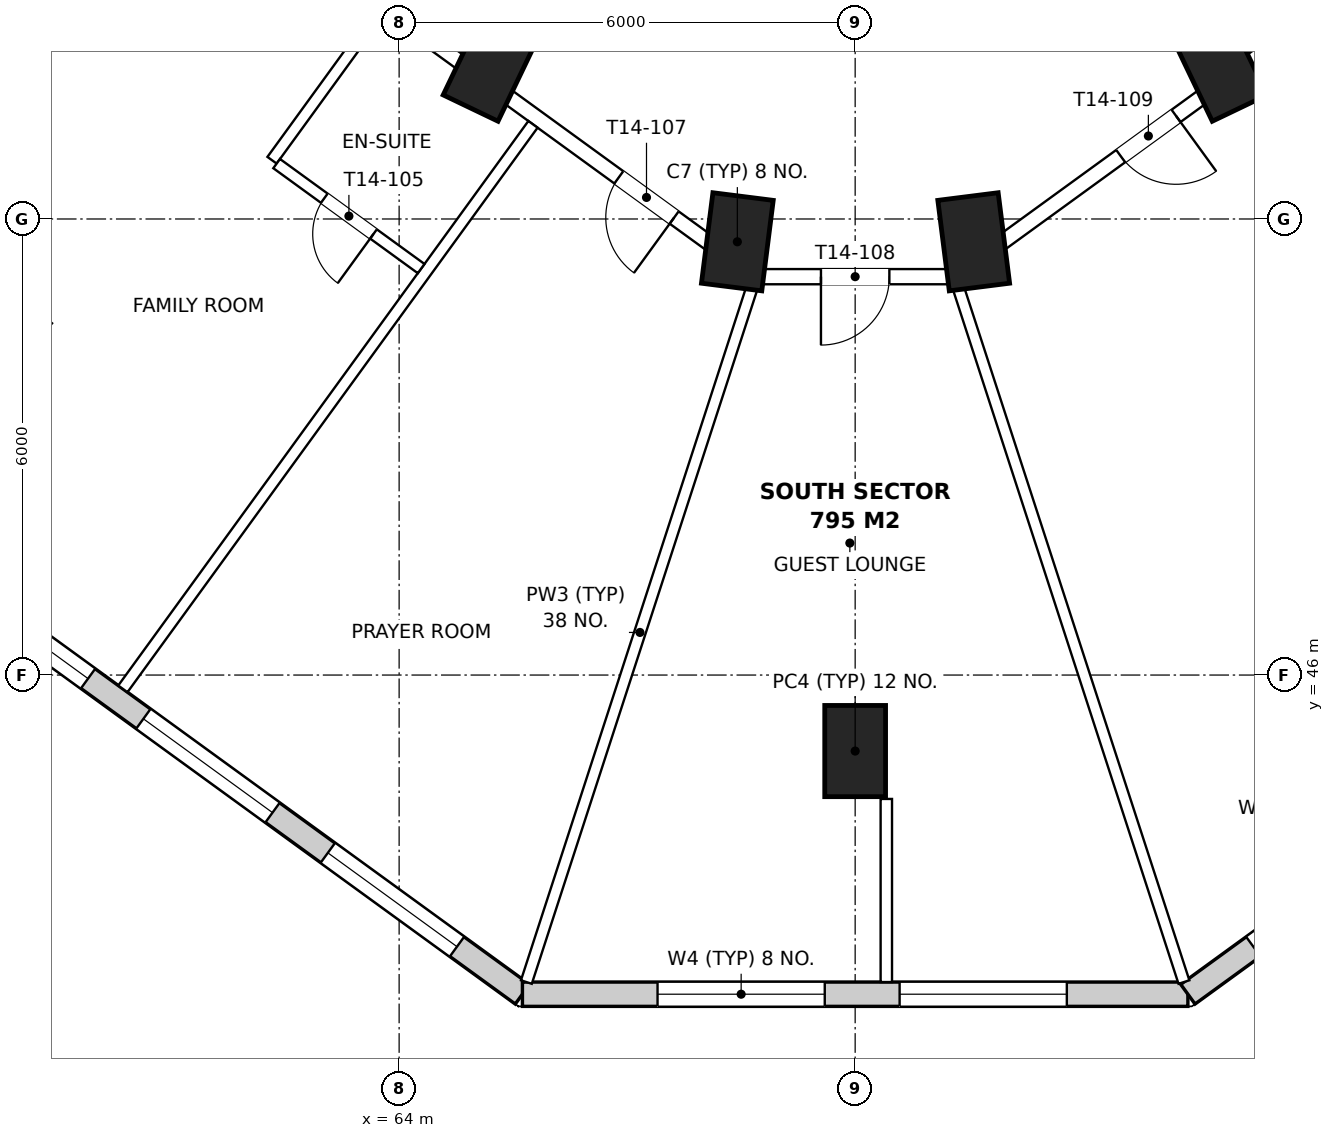
"""IFC4 building model, lengths in metres.
Left out: names, types, materials, properties, quantities, classifications, styles, units other than length and angle.
Written with IfcOpenShell. Run it as: python <this file> out.ifc"""

import sys

from ifc_helpers import new_model, si_unit, direction, frame, frame_2d, origin, origin_2d, place, context, subcontext, project, spatial, rectangle, extrude, element, fill, save


model = new_model("IFC4")
c1 = context("Model", 3, precision=1e-05, world=origin(), true_north=direction((0.0, 1.0)))
c2 = subcontext(c1, "Body", "Model", "MODEL_VIEW")
j1 = project(units=[si_unit("LENGTHUNIT", "METRE"), si_unit("PLANEANGLEUNIT", "RADIAN")], contexts=[c1])
p1 = place(None, origin())
s1 = spatial("IfcSite", under=j1, at=p1, CompositionType="ELEMENT")
p2 = place(p1, origin())
s2 = spatial("IfcBuilding", under=s1, at=p2, CompositionType="ELEMENT")
p3 = place(p2, frame((0.0, 0.0, 204.3)))
s3 = spatial("IfcBuildingStorey", under=s2, at=p3, CompositionType="ELEMENT", Elevation=204.3)
for number, where, z_axis, x_axis in (
    (1, (70.0, 45.0, 0.0), (0.0, 0.0, 1.0), (-1.0, 0.0, 0.0)),
    (2, (65.2, 54.0, 0.0), (0.0, 0.0, 1.0), (-0.902, 0.432, 0.0)),
    (3, (68.45, 51.7, 0.0), (0.0, 0.0, 1.0), (-0.992, 0.126, 0.0)),
    (4, (71.56, 51.7, 0.0), (0.0, 0.0, 1.0), (-0.992, -0.126, 0.0)),
    (5, (74.8, 54.0, 0.0), (0.0, 0.0, 1.0), (-0.902, -0.432, 0.0)),
):
    element("IfcColumn", number, at=place(p3, frame(where, z_axis=z_axis, x_axis=x_axis)), inside=s3, PredefinedType="COLUMN", context=c2, shape_type="SweptSolid", body=[
        extrude(rectangle(XDim=0.8, YDim=1.2, at=origin_2d()), origin(), (0.0, 0.0, 1.0), 3.9),
    ])
p4 = place(p3, frame((47.639, 54.867, 0.0), z_axis=(0.0, 0.0, 1.0), x_axis=(0.809017634756, -0.587784370883, 0.0)))
e6 = element("IfcWall", 6, at=p4, inside=s3, PredefinedType="SOLIDWALL", context=c2, shape_type="SweptSolid", body=[
    extrude(rectangle(XDim=22.229, YDim=0.32, at=frame_2d((11.114, 0.0))), origin(), (0.0, 0.0, 1.0), 3.6),
])
p5 = place(p4, frame((1.064, 0.0, 0.75)))
e7 = element("IfcOpeningElement", 7, at=p5, cuts=e6, PredefinedType="OPENING", context=c2, shape_type="SweptSolid", body=[
    extrude(rectangle(XDim=2.1, YDim=2.1, at=frame_2d((1.05, 1.05))), frame((0.0, 0.17, 0.0), z_axis=(0.0, -1.0, 0.0), x_axis=(1.0, 0.0, 0.0)), (0.0, 0.0, 1.0), 0.34),
])
p6 = place(p4, frame((4.064, 0.0, 0.75)))
e8 = element("IfcOpeningElement", 8, at=p6, cuts=e6, PredefinedType="OPENING", context=c2, shape_type="SweptSolid", body=[
    extrude(rectangle(XDim=2.1, YDim=2.1, at=frame_2d((1.05, 1.05))), frame((0.0, 0.17, 0.0), z_axis=(0.0, -1.0, 0.0), x_axis=(1.0, 0.0, 0.0)), (0.0, 0.0, 1.0), 0.34),
])
p7 = place(p4, frame((7.064, 0.0, 0.75)))
e9 = element("IfcOpeningElement", 9, at=p7, cuts=e6, PredefinedType="OPENING", context=c2, shape_type="SweptSolid", body=[
    extrude(rectangle(XDim=2.1, YDim=2.1, at=frame_2d((1.05, 1.05))), frame((0.0, 0.17, 0.0), z_axis=(0.0, -1.0, 0.0), x_axis=(1.0, 0.0, 0.0)), (0.0, 0.0, 1.0), 0.34),
])
p8 = place(p4, frame((10.064, 0.0, 0.75)))
e10 = element("IfcOpeningElement", 10, at=p8, cuts=e6, PredefinedType="OPENING", context=c2, shape_type="SweptSolid", body=[
    extrude(rectangle(XDim=2.1, YDim=2.1, at=frame_2d((1.05, 1.05))), frame((0.0, 0.17, 0.0), z_axis=(0.0, -1.0, 0.0), x_axis=(1.0, 0.0, 0.0)), (0.0, 0.0, 1.0), 0.34),
])
p9 = place(p4, frame((13.064, 0.0, 0.75)))
e11 = element("IfcOpeningElement", 11, at=p9, cuts=e6, PredefinedType="OPENING", context=c2, shape_type="SweptSolid", body=[
    extrude(rectangle(XDim=2.1, YDim=2.1, at=frame_2d((1.05, 1.05))), frame((0.0, 0.17, 0.0), z_axis=(0.0, -1.0, 0.0), x_axis=(1.0, 0.0, 0.0)), (0.0, 0.0, 1.0), 0.34),
])
p10 = place(p4, frame((16.064, 0.0, 0.75)))
e12 = element("IfcOpeningElement", 12, at=p10, cuts=e6, PredefinedType="OPENING", context=c2, shape_type="SweptSolid", body=[
    extrude(rectangle(XDim=2.1, YDim=2.1, at=frame_2d((1.05, 1.05))), frame((0.0, 0.17, 0.0), z_axis=(0.0, -1.0, 0.0), x_axis=(1.0, 0.0, 0.0)), (0.0, 0.0, 1.0), 0.34),
])
p11 = place(p4, frame((19.064, 0.0, 0.75)))
e13 = element("IfcOpeningElement", 13, at=p11, cuts=e6, PredefinedType="OPENING", context=c2, shape_type="SweptSolid", body=[
    extrude(rectangle(XDim=2.1, YDim=2.1, at=frame_2d((1.05, 1.05))), frame((0.0, 0.17, 0.0), z_axis=(0.0, -1.0, 0.0), x_axis=(1.0, 0.0, 0.0)), (0.0, 0.0, 1.0), 0.34),
])
p12 = place(p3, frame((65.622, 41.801, 0.0), z_axis=(0.0, 0.0, 1.0), x_axis=(1.0, 0.0, 0.0)))
e14 = element("IfcWall", 14, at=p12, inside=s3, PredefinedType="SOLIDWALL", context=c2, shape_type="SweptSolid", body=[
    extrude(rectangle(XDim=8.755, YDim=0.32, at=frame_2d((4.378, 0.0))), origin(), (0.0, 0.0, 1.0), 3.6),
])
p13 = place(p12, frame((1.778, 0.0, 0.75)))
e15 = element("IfcOpeningElement", 15, at=p13, cuts=e14, PredefinedType="OPENING", context=c2, shape_type="SweptSolid", body=[
    extrude(rectangle(XDim=2.2, YDim=2.1, at=frame_2d((1.1, 1.05))), frame((0.0, 0.17, 0.0), z_axis=(0.0, -1.0, 0.0), x_axis=(1.0, 0.0, 0.0)), (0.0, 0.0, 1.0), 0.34),
])
p14 = place(p12, frame((4.963, 0.0, 0.75)))
e16 = element("IfcOpeningElement", 16, at=p14, cuts=e14, PredefinedType="OPENING", context=c2, shape_type="SweptSolid", body=[
    extrude(rectangle(XDim=2.2, YDim=2.1, at=frame_2d((1.1, 1.05))), frame((0.0, 0.17, 0.0), z_axis=(0.0, -1.0, 0.0), x_axis=(1.0, 0.0, 0.0)), (0.0, 0.0, 1.0), 0.34),
])
p15 = place(p3, frame((74.378, 41.801, 0.0), z_axis=(0.0, 0.0, 1.0), x_axis=(0.809017634756, 0.587784370883, 0.0)))
e17 = element("IfcWall", 17, at=p15, inside=s3, PredefinedType="SOLIDWALL", context=c2, shape_type="SweptSolid", body=[
    extrude(rectangle(XDim=22.229, YDim=0.32, at=frame_2d((11.114, 0.0))), origin(), (0.0, 0.0, 1.0), 3.6),
])
p16 = place(p15, frame((1.064, 0.0, 0.75)))
e18 = element("IfcOpeningElement", 18, at=p16, cuts=e17, PredefinedType="OPENING", context=c2, shape_type="SweptSolid", body=[
    extrude(rectangle(XDim=2.1, YDim=2.1, at=frame_2d((1.05, 1.05))), frame((0.0, 0.17, 0.0), z_axis=(0.0, -1.0, 0.0), x_axis=(1.0, 0.0, 0.0)), (0.0, 0.0, 1.0), 0.34),
])
p17 = place(p15, frame((4.064, 0.0, 0.75)))
e19 = element("IfcOpeningElement", 19, at=p17, cuts=e17, PredefinedType="OPENING", context=c2, shape_type="SweptSolid", body=[
    extrude(rectangle(XDim=2.1, YDim=2.1, at=frame_2d((1.05, 1.05))), frame((0.0, 0.17, 0.0), z_axis=(0.0, -1.0, 0.0), x_axis=(1.0, 0.0, 0.0)), (0.0, 0.0, 1.0), 0.34),
])
p18 = place(p15, frame((7.064, 0.0, 0.75)))
e20 = element("IfcOpeningElement", 20, at=p18, cuts=e17, PredefinedType="OPENING", context=c2, shape_type="SweptSolid", body=[
    extrude(rectangle(XDim=2.1, YDim=2.1, at=frame_2d((1.05, 1.05))), frame((0.0, 0.17, 0.0), z_axis=(0.0, -1.0, 0.0), x_axis=(1.0, 0.0, 0.0)), (0.0, 0.0, 1.0), 0.34),
])
p19 = place(p15, frame((10.064, 0.0, 0.75)))
e21 = element("IfcOpeningElement", 21, at=p19, cuts=e17, PredefinedType="OPENING", context=c2, shape_type="SweptSolid", body=[
    extrude(rectangle(XDim=2.1, YDim=2.1, at=frame_2d((1.05, 1.05))), frame((0.0, 0.17, 0.0), z_axis=(0.0, -1.0, 0.0), x_axis=(1.0, 0.0, 0.0)), (0.0, 0.0, 1.0), 0.34),
])
p20 = place(p15, frame((13.064, 0.0, 0.75)))
e22 = element("IfcOpeningElement", 22, at=p20, cuts=e17, PredefinedType="OPENING", context=c2, shape_type="SweptSolid", body=[
    extrude(rectangle(XDim=2.1, YDim=2.1, at=frame_2d((1.05, 1.05))), frame((0.0, 0.17, 0.0), z_axis=(0.0, -1.0, 0.0), x_axis=(1.0, 0.0, 0.0)), (0.0, 0.0, 1.0), 0.34),
])
p21 = place(p15, frame((16.064, 0.0, 0.75)))
e23 = element("IfcOpeningElement", 23, at=p21, cuts=e17, PredefinedType="OPENING", context=c2, shape_type="SweptSolid", body=[
    extrude(rectangle(XDim=2.1, YDim=2.1, at=frame_2d((1.05, 1.05))), frame((0.0, 0.17, 0.0), z_axis=(0.0, -1.0, 0.0), x_axis=(1.0, 0.0, 0.0)), (0.0, 0.0, 1.0), 0.34),
])
p22 = place(p15, frame((19.064, 0.0, 0.75)))
e24 = element("IfcOpeningElement", 24, at=p22, cuts=e17, PredefinedType="OPENING", context=c2, shape_type="SweptSolid", body=[
    extrude(rectangle(XDim=2.1, YDim=2.1, at=frame_2d((1.05, 1.05))), frame((0.0, 0.17, 0.0), z_axis=(0.0, -1.0, 0.0), x_axis=(1.0, 0.0, 0.0)), (0.0, 0.0, 1.0), 0.34),
])
p23 = place(p3, frame((77.559, 55.781, 0.0), z_axis=(0.0, 0.0, 1.0), x_axis=(-0.80901190539, -0.587792256616, 0.0)))
e25 = element("IfcWall", 25, at=p23, inside=s3, PredefinedType="PARTITIONING", context=c2, shape_type="SweptSolid", body=[
    extrude(rectangle(XDim=7.691, YDim=0.2, at=frame_2d((3.846, 0.0))), origin(), (0.0, 0.0, 1.0), 3.05),
])
p24 = place(p23, frame((4.125, 0.0, 0.0)))
e26 = element("IfcOpeningElement", 26, at=p24, cuts=e25, PredefinedType="OPENING", context=c2, shape_type="SweptSolid", body=[
    extrude(rectangle(XDim=0.9, YDim=2.1, at=frame_2d((0.45, 1.05))), frame((0.0, 0.11, 0.0), z_axis=(0.0, -1.0, 0.0), x_axis=(1.0, 0.0, 0.0)), (0.0, 0.0, 1.0), 0.22),
])
p25 = place(p3, frame((71.278, 51.241, 0.0), z_axis=(0.0, 0.0, 1.0), x_axis=(-1.0, 0.0, 0.0)))
e27 = element("IfcWall", 27, at=p25, inside=s3, PredefinedType="PARTITIONING", context=c2, shape_type="SweptSolid", body=[
    extrude(rectangle(XDim=2.556, YDim=0.2, at=frame_2d((1.278, 0.0))), origin(), (0.0, 0.0, 1.0), 3.6),
])
p26 = place(p25, frame((0.828, 0.0, 0.0)))
e28 = element("IfcOpeningElement", 28, at=p26, cuts=e27, PredefinedType="OPENING", context=c2, shape_type="SweptSolid", body=[
    extrude(rectangle(XDim=0.9, YDim=2.1, at=frame_2d((0.45, 1.05))), frame((0.0, 0.11, 0.0), z_axis=(0.0, -1.0, 0.0), x_axis=(1.0, 0.0, 0.0)), (0.0, 0.0, 1.0), 0.22),
])
p27 = place(p3, frame((68.663, 51.26, 0.0), z_axis=(0.0, 0.0, 1.0), x_axis=(-0.80901190539, 0.587792256616, 0.0)))
e29 = element("IfcWall", 29, at=p27, inside=s3, PredefinedType="PARTITIONING", context=c2, shape_type="SweptSolid", body=[
    extrude(rectangle(XDim=7.691, YDim=0.2, at=frame_2d((3.846, 0.0))), origin(), (0.0, 0.0, 1.0), 3.05),
])
p28 = place(p27, frame((6.604, 0.0, 0.0)))
e30 = element("IfcOpeningElement", 30, at=p28, cuts=e29, PredefinedType="OPENING", context=c2, shape_type="SweptSolid", body=[
    extrude(rectangle(XDim=0.9, YDim=2.1, at=frame_2d((0.45, 1.05))), frame((0.0, 0.11, 0.0), z_axis=(0.0, -1.0, 0.0), x_axis=(1.0, 0.0, 0.0)), (0.0, 0.0, 1.0), 0.22),
])
p29 = place(p27, frame((1.291, 0.0, 0.0)))
e31 = element("IfcOpeningElement", 31, at=p29, cuts=e29, PredefinedType="OPENING", context=c2, shape_type="SweptSolid", body=[
    extrude(rectangle(XDim=0.9, YDim=2.1, at=frame_2d((0.45, 1.05))), frame((0.0, 0.11, 0.0), z_axis=(0.0, -1.0, 0.0), x_axis=(1.0, 0.0, 0.0)), (0.0, 0.0, 1.0), 0.22),
])
for number, where, z_axis, x_axis in (
    (32, (65.674, 41.961, 0.0), (0.0, 0.0, 1.0), (0.309, 0.951, 0.0)),
    (33, (74.326, 41.961, 0.0), (0.0, 0.0, 1.0), (-0.309, 0.951, 0.0)),
):
    element("IfcWall", number, at=place(p3, frame(where, z_axis=z_axis, x_axis=x_axis)), inside=s3, PredefinedType="PARTITIONING", context=c2, shape_type="SweptSolid", body=[
        extrude(rectangle(XDim=9.672, YDim=0.15, at=frame_2d((4.836, 0.0))), origin(), (0.0, 0.0, 1.0), 3.6),
    ])
p30 = place(p3, frame((55.511, 49.345, 0.0), z_axis=(0.0, 0.0, 1.0), x_axis=(0.587782705134, 0.809018844988, 0.0)))
e34 = element("IfcWall", 34, at=p30, inside=s3, PredefinedType="PARTITIONING", context=c2, shape_type="SweptSolid", body=[
    extrude(rectangle(XDim=7.801, YDim=0.15, at=frame_2d((3.9, 0.0))), origin(), (0.0, 0.0, 1.0), 3.15),
])
p31 = place(p3, frame((60.365, 45.818, 0.0), z_axis=(0.0, 0.0, 1.0), x_axis=(0.587777877013, 0.809022352778, 0.0)))
e35 = element("IfcWall", 35, at=p31, inside=s3, PredefinedType="PARTITIONING", context=c2, shape_type="SweptSolid", body=[
    extrude(rectangle(XDim=9.18, YDim=0.15, at=frame_2d((4.59, 0.0))), origin(), (0.0, 0.0, 1.0), 3.6),
])
p32 = place(p3, frame((63.739, 54.715, 0.0), z_axis=(0.0, 0.0, 1.0), x_axis=(-0.587772420479, -0.809026317077, 0.0)))
e36 = element("IfcWall", 36, at=p32, inside=s3, PredefinedType="PARTITIONING", context=c2, shape_type="SweptSolid", body=[
    extrude(rectangle(XDim=2.4, YDim=0.15, at=frame_2d((1.2, 0.0))), origin(), (0.0, 0.0, 1.0), 3.6),
])
p33 = place(p3, frame((64.29, 51.347, 0.0), z_axis=(0.0, 0.0, 1.0), x_axis=(-0.808996573949, 0.587813357571, 0.0)))
e37 = element("IfcWall", 37, at=p33, inside=s3, PredefinedType="PARTITIONING", context=c2, shape_type="SweptSolid", body=[
    extrude(rectangle(XDim=2.35, YDim=0.15, at=frame_2d((1.175, 0.0))), origin(), (0.0, 0.0, 1.0), 3.6),
])
p34 = place(p33, frame((0.775, 0.0, 0.0)))
e38 = element("IfcOpeningElement", 38, at=p34, cuts=e37, PredefinedType="OPENING", context=c2, shape_type="SweptSolid", body=[
    extrude(rectangle(XDim=0.8, YDim=2.1, at=frame_2d((0.4, 1.05))), frame((0.0, 0.085, 0.0), z_axis=(0.0, -1.0, 0.0), x_axis=(1.0, 0.0, 0.0)), (0.0, 0.0, 1.0), 0.17),
])
p35 = place(p3, frame((70.41, 44.37, 0.0), z_axis=(0.0, 0.0, 1.0), x_axis=(0.0, -1.0, 0.0)))
e39 = element("IfcWall", 39, at=p35, inside=s3, PredefinedType="PARTITIONING", context=c2, shape_type="SweptSolid", body=[
    extrude(rectangle(XDim=2.409, YDim=0.15, at=frame_2d((1.205, 0.0))), origin(), (0.0, 0.0, 1.0), 3.6),
])
p36 = place(p9, origin())
e40 = element("IfcWindow", 40, at=p36, inside=s3, PartitioningType="SINGLE_PANEL", PredefinedType="WINDOW", context=c2, shape_type="SweptSolid", body=[
    extrude(rectangle(XDim=2.1, YDim=2.1, at=frame_2d((1.05, 1.05))), frame((0.0, 0.07, 0.0), z_axis=(0.0, -1.0, 0.0), x_axis=(1.0, 0.0, 0.0)), (0.0, 0.0, 1.0), 0.06),
])
fill(e11, e40)
p37 = place(p10, origin())
e41 = element("IfcWindow", 41, at=p37, inside=s3, PartitioningType="SINGLE_PANEL", PredefinedType="WINDOW", context=c2, shape_type="SweptSolid", body=[
    extrude(rectangle(XDim=2.1, YDim=2.1, at=frame_2d((1.05, 1.05))), frame((0.0, 0.07, 0.0), z_axis=(0.0, -1.0, 0.0), x_axis=(1.0, 0.0, 0.0)), (0.0, 0.0, 1.0), 0.06),
])
fill(e12, e41)
p38 = place(p11, origin())
e42 = element("IfcWindow", 42, at=p38, inside=s3, PartitioningType="SINGLE_PANEL", PredefinedType="WINDOW", context=c2, shape_type="SweptSolid", body=[
    extrude(rectangle(XDim=2.1, YDim=2.1, at=frame_2d((1.05, 1.05))), frame((0.0, 0.07, 0.0), z_axis=(0.0, -1.0, 0.0), x_axis=(1.0, 0.0, 0.0)), (0.0, 0.0, 1.0), 0.06),
])
fill(e13, e42)
p39 = place(p13, origin())
e43 = element("IfcWindow", 43, at=p39, inside=s3, PartitioningType="SINGLE_PANEL", PredefinedType="WINDOW", context=c2, shape_type="SweptSolid", body=[
    extrude(rectangle(XDim=2.2, YDim=2.1, at=frame_2d((1.1, 1.05))), frame((0.0, 0.07, 0.0), z_axis=(0.0, -1.0, 0.0), x_axis=(1.0, 0.0, 0.0)), (0.0, 0.0, 1.0), 0.06),
])
fill(e15, e43)
p40 = place(p14, origin())
e44 = element("IfcWindow", 44, at=p40, inside=s3, PartitioningType="SINGLE_PANEL", PredefinedType="WINDOW", context=c2, shape_type="SweptSolid", body=[
    extrude(rectangle(XDim=2.2, YDim=2.1, at=frame_2d((1.1, 1.05))), frame((0.0, 0.07, 0.0), z_axis=(0.0, -1.0, 0.0), x_axis=(1.0, 0.0, 0.0)), (0.0, 0.0, 1.0), 0.06),
])
fill(e16, e44)
p41 = place(p16, origin())
e45 = element("IfcWindow", 45, at=p41, inside=s3, PartitioningType="SINGLE_PANEL", PredefinedType="WINDOW", context=c2, shape_type="SweptSolid", body=[
    extrude(rectangle(XDim=2.1, YDim=2.1, at=frame_2d((1.05, 1.05))), frame((0.0, 0.07, 0.0), z_axis=(0.0, -1.0, 0.0), x_axis=(1.0, 0.0, 0.0)), (0.0, 0.0, 1.0), 0.06),
])
fill(e18, e45)
p42 = place(p34, origin())
e46 = element("IfcDoor", 46, at=p42, inside=s3, OperationType="SINGLE_SWING_LEFT", PredefinedType="DOOR", context=c2, shape_type="SweptSolid", body=[
    extrude(rectangle(XDim=0.8, YDim=2.1, at=frame_2d((0.4, 1.05))), frame((0.0, 0.025, 0.0), z_axis=(0.0, -1.0, 0.0), x_axis=(1.0, 0.0, 0.0)), (0.0, 0.0, 1.0), 0.05),
])
fill(e38, e46)
p43 = place(p29, origin())
e47 = element("IfcDoor", 47, at=p43, inside=s3, OperationType="SINGLE_SWING_LEFT", PredefinedType="DOOR", context=c2, shape_type="SweptSolid", body=[
    extrude(rectangle(XDim=0.9, YDim=2.1, at=frame_2d((0.45, 1.05))), frame((0.0, 0.025, 0.0), z_axis=(0.0, -1.0, 0.0), x_axis=(1.0, 0.0, 0.0)), (0.0, 0.0, 1.0), 0.05),
])
fill(e31, e47)
p44 = place(p26, origin())
e48 = element("IfcDoor", 48, at=p44, inside=s3, OperationType="SINGLE_SWING_RIGHT", PredefinedType="DOOR", context=c2, shape_type="SweptSolid", body=[
    extrude(rectangle(XDim=0.9, YDim=2.1, at=frame_2d((0.45, 1.05))), frame((0.0, 0.025, 0.0), z_axis=(0.0, -1.0, 0.0), x_axis=(1.0, 0.0, 0.0)), (0.0, 0.0, 1.0), 0.05),
])
fill(e28, e48)
p45 = place(p24, origin())
e49 = element("IfcDoor", 49, at=p45, inside=s3, OperationType="SINGLE_SWING_LEFT", PredefinedType="DOOR", context=c2, shape_type="SweptSolid", body=[
    extrude(rectangle(XDim=0.9, YDim=2.1, at=frame_2d((0.45, 1.05))), frame((0.0, 0.025, 0.0), z_axis=(0.0, -1.0, 0.0), x_axis=(1.0, 0.0, 0.0)), (0.0, 0.0, 1.0), 0.05),
])
fill(e26, e49)
save(model, sys.argv[1])
